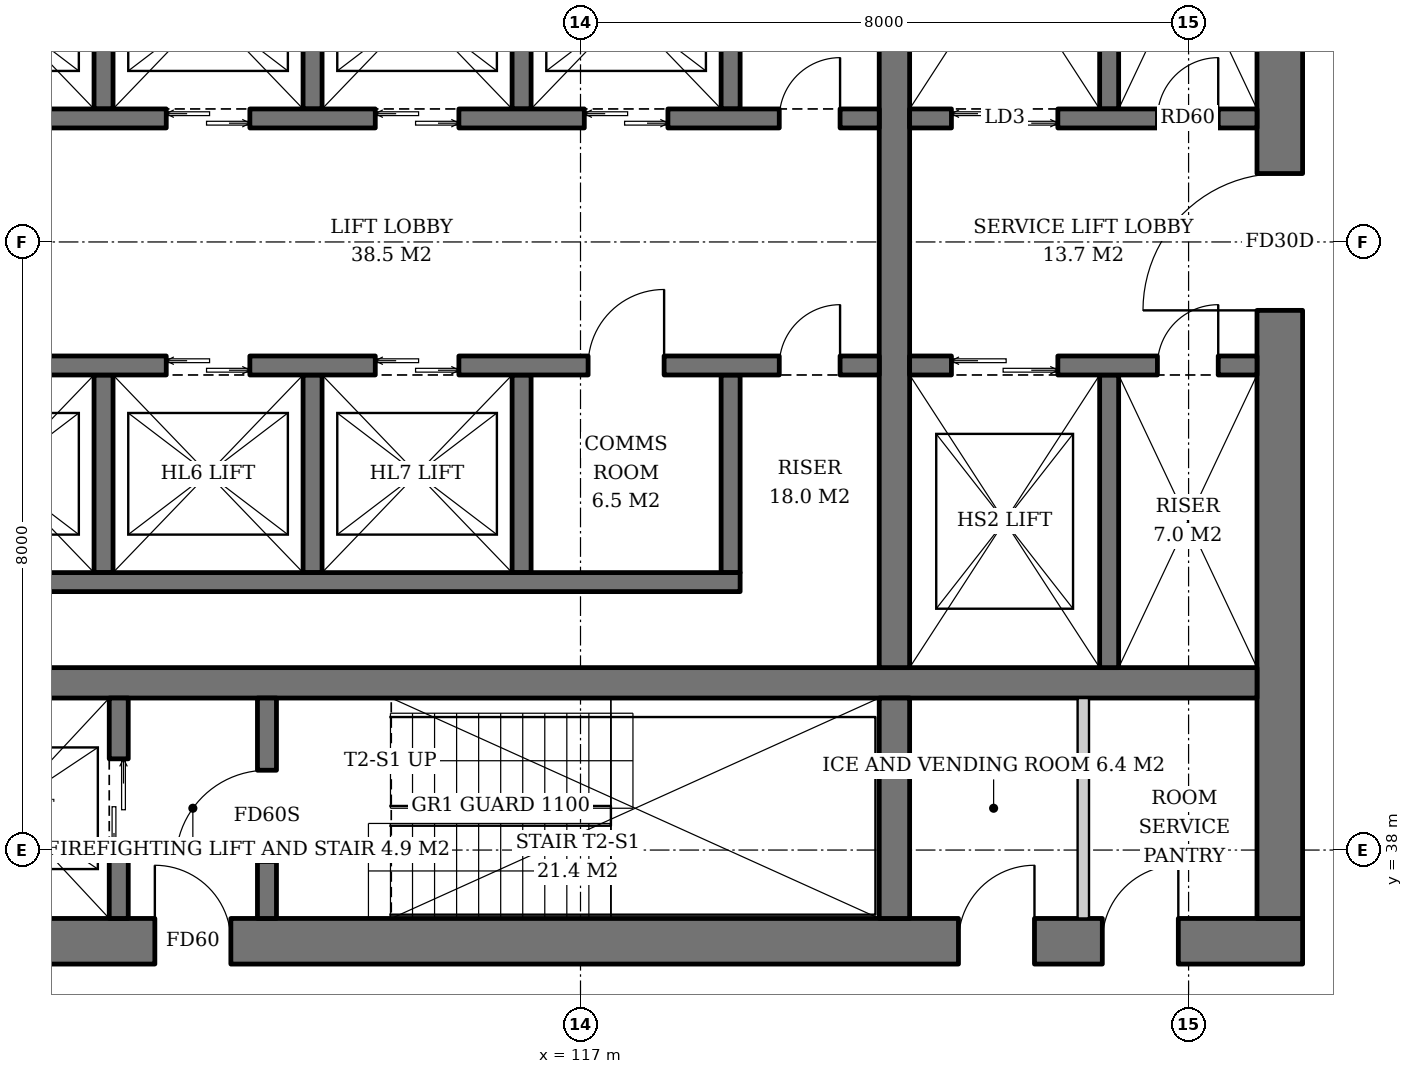
"""IFC4 building model, lengths in metres.
Left out: names, types, materials, properties, quantities, classifications, styles, units other than length and angle.
Written with IfcOpenShell. Run it as: python <this file> out.ifc"""

import sys

from ifc_helpers import new_model, si_unit, direction, frame, frame_2d, origin, place, context, subcontext, project, spatial, rectangle, extrude, element, fill, save


model = new_model("IFC4")
c1 = context("Model", 3, precision=1e-05, world=origin(), true_north=direction((0.0, 1.0)))
c2 = subcontext(c1, "Body", "Model", "MODEL_VIEW")
j1 = project(units=[si_unit("LENGTHUNIT", "METRE"), si_unit("PLANEANGLEUNIT", "RADIAN")], contexts=[c1])
p1 = place(None, origin())
s1 = spatial("IfcSite", under=j1, at=p1, CompositionType="ELEMENT")
p2 = place(p1, origin())
s2 = spatial("IfcBuilding", under=s1, at=p2, CompositionType="ELEMENT")
p3 = place(p2, frame((0.0, 0.0, 66.6)))
s3 = spatial("IfcBuildingStorey", under=s2, at=p3, CompositionType="ELEMENT", Elevation=66.6)
p4 = place(p3, frame((107.5, 36.8, 0.0), z_axis=(0.0, 0.0, 1.0), x_axis=(1.0, 0.0, 0.0)))
e1 = element("IfcWall", 1, at=p4, inside=s3, PredefinedType="SHEAR", context=c2, shape_type="SweptSolid", body=[
    extrude(rectangle(XDim=19.0, YDim=0.6, at=frame_2d((9.5, 0.0))), origin(), (0.0, 0.0, 1.0), 3.8),
])
p5 = place(p4, frame((3.9, 0.0, 0.0)))
e2 = element("IfcOpeningElement", 2, at=p5, cuts=e1, PredefinedType="OPENING", context=c2, shape_type="SweptSolid", body=[
    extrude(rectangle(XDim=1.0, YDim=2.1, at=frame_2d((0.5, 1.05))), frame((0.0, 0.31, 0.0), z_axis=(0.0, -1.0, 0.0), x_axis=(1.0, 0.0, 0.0)), (0.0, 0.0, 1.0), 0.62),
])
p6 = place(p4, frame((14.472, 0.0, 0.0)))
e3 = element("IfcOpeningElement", 3, at=p6, cuts=e1, PredefinedType="OPENING", context=c2, shape_type="SweptSolid", body=[
    extrude(rectangle(XDim=1.0, YDim=2.1, at=frame_2d((0.5, 1.05))), frame((0.0, 0.31, 0.0), z_axis=(0.0, -1.0, 0.0), x_axis=(1.0, 0.0, 0.0)), (0.0, 0.0, 1.0), 0.62),
])
p7 = place(p4, frame((16.365, 0.0, 0.0)))
e4 = element("IfcOpeningElement", 4, at=p7, cuts=e1, PredefinedType="OPENING", context=c2, shape_type="SweptSolid", body=[
    extrude(rectangle(XDim=1.0, YDim=2.1, at=frame_2d((0.5, 1.05))), frame((0.0, 0.31, 0.0), z_axis=(0.0, -1.0, 0.0), x_axis=(1.0, 0.0, 0.0)), (0.0, 0.0, 1.0), 0.62),
])
p8 = place(p3, frame((126.2, 37.1, 0.0), z_axis=(0.0, 0.0, 1.0), x_axis=(0.0, 1.0, 0.0)))
e5 = element("IfcWall", 5, at=p8, inside=s3, PredefinedType="SHEAR", context=c2, shape_type="SweptSolid", body=[
    extrude(rectangle(XDim=17.8, YDim=0.6, at=frame_2d((8.9, 0.0))), origin(), (0.0, 0.0, 1.0), 3.8),
])
p9 = place(p8, frame((8.0, 0.0, 0.0)))
e6 = element("IfcOpeningElement", 6, at=p9, cuts=e5, PredefinedType="OPENING", context=c2, shape_type="SweptSolid", body=[
    extrude(rectangle(XDim=1.8, YDim=2.4, at=frame_2d((0.9, 1.2))), frame((0.0, 0.31, 0.0), z_axis=(0.0, -1.0, 0.0), x_axis=(1.0, 0.0, 0.0)), (0.0, 0.0, 1.0), 0.62),
])
p10 = place(p3, frame((108.1, 40.2, 0.0), z_axis=(0.0, 0.0, 1.0), x_axis=(1.0, 0.0, 0.0)))
e7 = element("IfcWall", 7, at=p10, inside=s3, PredefinedType="SHEAR", context=c2, shape_type="SweptSolid", body=[
    extrude(rectangle(XDim=17.8, YDim=0.4, at=frame_2d((8.9, 0.0))), origin(), (0.0, 0.0, 1.0), 3.8),
])
p11 = place(p3, frame((121.13, 37.1, 0.0), z_axis=(0.0, 0.0, 1.0), x_axis=(0.0, 1.0, 0.0)))
e8 = element("IfcWall", 8, at=p11, inside=s3, PredefinedType="SHEAR", context=c2, shape_type="SweptSolid", body=[
    extrude(rectangle(XDim=2.9, YDim=0.4, at=frame_2d((1.45, 0.0))), origin(), (0.0, 0.0, 1.0), 3.8),
])
p12 = place(p3, frame((121.13, 40.4, 0.0), z_axis=(0.0, 0.0, 1.0), x_axis=(0.0, 1.0, 0.0)))
e9 = element("IfcWall", 9, at=p12, inside=s3, PredefinedType="SHEAR", context=c2, shape_type="SweptSolid", body=[
    extrude(rectangle(XDim=11.2, YDim=0.4, at=frame_2d((5.6, 0.0))), origin(), (0.0, 0.0, 1.0), 3.8),
])
p13 = place(p3, frame((110.925, 37.1, 0.0), z_axis=(0.0, 0.0, 1.0), x_axis=(0.0, 1.0, 0.0)))
e10 = element("IfcWall", 10, at=p13, inside=s3, PredefinedType="SHEAR", context=c2, shape_type="SweptSolid", body=[
    extrude(rectangle(XDim=2.9, YDim=0.25, at=frame_2d((1.45, 0.0))), origin(), (0.0, 0.0, 1.0), 3.8),
])
p14 = place(p13, frame((0.8, 0.0, 0.0)))
e11 = element("IfcOpeningElement", 11, at=p14, cuts=e10, PredefinedType="OPENING", context=c2, shape_type="SweptSolid", body=[
    extrude(rectangle(XDim=1.3, YDim=2.2, at=frame_2d((0.65, 1.1))), frame((0.0, 0.135, 0.0), z_axis=(0.0, -1.0, 0.0), x_axis=(1.0, 0.0, 0.0)), (0.0, 0.0, 1.0), 0.27),
])
p15 = place(p3, frame((112.875, 37.1, 0.0), z_axis=(0.0, 0.0, 1.0), x_axis=(0.0, 1.0, 0.0)))
e12 = element("IfcWall", 12, at=p15, inside=s3, PredefinedType="SHEAR", context=c2, shape_type="SweptSolid", body=[
    extrude(rectangle(XDim=2.9, YDim=0.25, at=frame_2d((1.45, 0.0))), origin(), (0.0, 0.0, 1.0), 3.8),
])
p16 = place(p15, frame((0.75, 0.0, 0.0)))
e13 = element("IfcOpeningElement", 13, at=p16, cuts=e12, PredefinedType="OPENING", context=c2, shape_type="SweptSolid", body=[
    extrude(rectangle(XDim=1.2, YDim=2.1, at=frame_2d((0.6, 1.05))), frame((0.0, 0.135, 0.0), z_axis=(0.0, -1.0, 0.0), x_axis=(1.0, 0.0, 0.0)), (0.0, 0.0, 1.0), 0.27),
])
for number, where, z_axis, x_axis in (
    (14, (110.725, 47.75, 0.0), (0.0, 0.0, 1.0), (0.0, 1.0, 0.0)),
    (15, (113.475, 47.75, 0.0), (0.0, 0.0, 1.0), (0.0, 1.0, 0.0)),
    (16, (116.225, 47.75, 0.0), (0.0, 0.0, 1.0), (0.0, 1.0, 0.0)),
    (17, (118.975, 47.75, 0.0), (0.0, 0.0, 1.0), (0.0, 1.0, 0.0)),
):
    element("IfcWall", number, at=place(p3, frame(where, z_axis=z_axis, x_axis=x_axis)), inside=s3, PredefinedType="SHEAR", context=c2, shape_type="SweptSolid", body=[
        extrude(rectangle(XDim=2.6, YDim=0.25, at=frame_2d((1.3, 0.0))), origin(), (0.0, 0.0, 1.0), 3.8),
    ])
p17 = place(p3, frame((108.1, 47.625, 0.0), z_axis=(0.0, 0.0, 1.0), x_axis=(1.0, 0.0, 0.0)))
e18 = element("IfcWall", 18, at=p17, inside=s3, PredefinedType="SHEAR", context=c2, shape_type="SweptSolid", body=[
    extrude(rectangle(XDim=12.83, YDim=0.25, at=frame_2d((6.415, 0.0))), origin(), (0.0, 0.0, 1.0), 3.8),
])
p18 = place(p17, frame((0.7, 0.0, 0.0)))
e19 = element("IfcOpeningElement", 19, at=p18, cuts=e18, PredefinedType="OPENING", context=c2, shape_type="SweptSolid", body=[
    extrude(rectangle(XDim=1.1, YDim=2.2, at=frame_2d((0.55, 1.1))), frame((0.0, 0.135, 0.0), z_axis=(0.0, -1.0, 0.0), x_axis=(1.0, 0.0, 0.0)), (0.0, 0.0, 1.0), 0.27),
])
p19 = place(p17, frame((3.45, 0.0, 0.0)))
e20 = element("IfcOpeningElement", 20, at=p19, cuts=e18, PredefinedType="OPENING", context=c2, shape_type="SweptSolid", body=[
    extrude(rectangle(XDim=1.1, YDim=2.2, at=frame_2d((0.55, 1.1))), frame((0.0, 0.135, 0.0), z_axis=(0.0, -1.0, 0.0), x_axis=(1.0, 0.0, 0.0)), (0.0, 0.0, 1.0), 0.27),
])
p20 = place(p17, frame((6.2, 0.0, 0.0)))
e21 = element("IfcOpeningElement", 21, at=p20, cuts=e18, PredefinedType="OPENING", context=c2, shape_type="SweptSolid", body=[
    extrude(rectangle(XDim=1.1, YDim=2.2, at=frame_2d((0.55, 1.1))), frame((0.0, 0.135, 0.0), z_axis=(0.0, -1.0, 0.0), x_axis=(1.0, 0.0, 0.0)), (0.0, 0.0, 1.0), 0.27),
])
p21 = place(p17, frame((8.95, 0.0, 0.0)))
e22 = element("IfcOpeningElement", 22, at=p21, cuts=e18, PredefinedType="OPENING", context=c2, shape_type="SweptSolid", body=[
    extrude(rectangle(XDim=1.1, YDim=2.2, at=frame_2d((0.55, 1.1))), frame((0.0, 0.135, 0.0), z_axis=(0.0, -1.0, 0.0), x_axis=(1.0, 0.0, 0.0)), (0.0, 0.0, 1.0), 0.27),
])
p22 = place(p17, frame((11.515, 0.0, 0.0)))
e23 = element("IfcOpeningElement", 23, at=p22, cuts=e18, PredefinedType="OPENING", context=c2, shape_type="SweptSolid", body=[
    extrude(rectangle(XDim=0.8, YDim=2.0, at=frame_2d((0.4, 1.0))), frame((0.0, 0.135, 0.0), z_axis=(0.0, -1.0, 0.0), x_axis=(1.0, 0.0, 0.0)), (0.0, 0.0, 1.0), 0.27),
])
for number, where, z_axis, x_axis in (
    (24, (110.725, 44.25, 0.0), (0.0, 0.0, 1.0), (0.0, -1.0, 0.0)),
    (25, (113.475, 44.25, 0.0), (0.0, 0.0, 1.0), (0.0, -1.0, 0.0)),
    (26, (116.225, 44.25, 0.0), (0.0, 0.0, 1.0), (0.0, -1.0, 0.0)),
    (27, (118.975, 44.25, 0.0), (0.0, 0.0, 1.0), (0.0, -1.0, 0.0)),
):
    element("IfcWall", number, at=place(p3, frame(where, z_axis=z_axis, x_axis=x_axis)), inside=s3, PredefinedType="SHEAR", context=c2, shape_type="SweptSolid", body=[
        extrude(rectangle(XDim=2.6, YDim=0.25, at=frame_2d((1.3, 0.0))), origin(), (0.0, 0.0, 1.0), 3.8),
    ])
p23 = place(p3, frame((108.1, 41.525, 0.0), z_axis=(0.0, 0.0, 1.0), x_axis=(1.0, 0.0, 0.0)))
e28 = element("IfcWall", 28, at=p23, inside=s3, PredefinedType="SHEAR", context=c2, shape_type="SweptSolid", body=[
    extrude(rectangle(XDim=11.0, YDim=0.25, at=frame_2d((5.5, 0.0))), origin(), (0.0, 0.0, 1.0), 3.8),
])
p24 = place(p3, frame((108.1, 44.375, 0.0), z_axis=(0.0, 0.0, 1.0), x_axis=(1.0, 0.0, 0.0)))
e29 = element("IfcWall", 29, at=p24, inside=s3, PredefinedType="SHEAR", context=c2, shape_type="SweptSolid", body=[
    extrude(rectangle(XDim=12.83, YDim=0.25, at=frame_2d((6.415, 0.0))), origin(), (0.0, 0.0, 1.0), 3.8),
])
p25 = place(p24, frame((0.7, 0.0, 0.0)))
e30 = element("IfcOpeningElement", 30, at=p25, cuts=e29, PredefinedType="OPENING", context=c2, shape_type="SweptSolid", body=[
    extrude(rectangle(XDim=1.1, YDim=2.2, at=frame_2d((0.55, 1.1))), frame((0.0, 0.135, 0.0), z_axis=(0.0, -1.0, 0.0), x_axis=(1.0, 0.0, 0.0)), (0.0, 0.0, 1.0), 0.27),
])
p26 = place(p24, frame((3.45, 0.0, 0.0)))
e31 = element("IfcOpeningElement", 31, at=p26, cuts=e29, PredefinedType="OPENING", context=c2, shape_type="SweptSolid", body=[
    extrude(rectangle(XDim=1.1, YDim=2.2, at=frame_2d((0.55, 1.1))), frame((0.0, 0.135, 0.0), z_axis=(0.0, -1.0, 0.0), x_axis=(1.0, 0.0, 0.0)), (0.0, 0.0, 1.0), 0.27),
])
p27 = place(p24, frame((6.2, 0.0, 0.0)))
e32 = element("IfcOpeningElement", 32, at=p27, cuts=e29, PredefinedType="OPENING", context=c2, shape_type="SweptSolid", body=[
    extrude(rectangle(XDim=1.1, YDim=2.2, at=frame_2d((0.55, 1.1))), frame((0.0, 0.135, 0.0), z_axis=(0.0, -1.0, 0.0), x_axis=(1.0, 0.0, 0.0)), (0.0, 0.0, 1.0), 0.27),
])
p28 = place(p24, frame((9.0, 0.0, 0.0)))
e33 = element("IfcOpeningElement", 33, at=p28, cuts=e29, PredefinedType="OPENING", context=c2, shape_type="SweptSolid", body=[
    extrude(rectangle(XDim=1.0, YDim=2.1, at=frame_2d((0.5, 1.05))), frame((0.0, 0.135, 0.0), z_axis=(0.0, -1.0, 0.0), x_axis=(1.0, 0.0, 0.0)), (0.0, 0.0, 1.0), 0.27),
])
p29 = place(p24, frame((11.515, 0.0, 0.0)))
e34 = element("IfcOpeningElement", 34, at=p29, cuts=e29, PredefinedType="OPENING", context=c2, shape_type="SweptSolid", body=[
    extrude(rectangle(XDim=0.8, YDim=2.0, at=frame_2d((0.4, 1.0))), frame((0.0, 0.135, 0.0), z_axis=(0.0, -1.0, 0.0), x_axis=(1.0, 0.0, 0.0)), (0.0, 0.0, 1.0), 0.27),
])
p30 = place(p3, frame((123.955, 47.75, 0.0), z_axis=(0.0, 0.0, 1.0), x_axis=(0.0, 1.0, 0.0)))
e35 = element("IfcWall", 35, at=p30, inside=s3, PredefinedType="SHEAR", context=c2, shape_type="SweptSolid", body=[
    extrude(rectangle(XDim=3.85, YDim=0.25, at=frame_2d((1.925, 0.0))), origin(), (0.0, 0.0, 1.0), 3.8),
])
p31 = place(p3, frame((121.33, 47.625, 0.0), z_axis=(0.0, 0.0, 1.0), x_axis=(1.0, 0.0, 0.0)))
e36 = element("IfcWall", 36, at=p31, inside=s3, PredefinedType="SHEAR", context=c2, shape_type="SweptSolid", body=[
    extrude(rectangle(XDim=4.57, YDim=0.25, at=frame_2d((2.285, 0.0))), origin(), (0.0, 0.0, 1.0), 3.8),
])
p32 = place(p31, frame((0.55, 0.0, 0.0)))
e37 = element("IfcOpeningElement", 37, at=p32, cuts=e36, PredefinedType="OPENING", context=c2, shape_type="SweptSolid", body=[
    extrude(rectangle(XDim=1.4, YDim=2.4, at=frame_2d((0.7, 1.2))), frame((0.0, 0.135, 0.0), z_axis=(0.0, -1.0, 0.0), x_axis=(1.0, 0.0, 0.0)), (0.0, 0.0, 1.0), 0.27),
])
p33 = place(p31, frame((3.26, 0.0, 0.0)))
e38 = element("IfcOpeningElement", 38, at=p33, cuts=e36, PredefinedType="OPENING", context=c2, shape_type="SweptSolid", body=[
    extrude(rectangle(XDim=0.8, YDim=2.0, at=frame_2d((0.4, 1.0))), frame((0.0, 0.135, 0.0), z_axis=(0.0, -1.0, 0.0), x_axis=(1.0, 0.0, 0.0)), (0.0, 0.0, 1.0), 0.27),
])
p34 = place(p3, frame((123.955, 44.25, 0.0), z_axis=(0.0, 0.0, 1.0), x_axis=(0.0, -1.0, 0.0)))
e39 = element("IfcWall", 39, at=p34, inside=s3, PredefinedType="SHEAR", context=c2, shape_type="SweptSolid", body=[
    extrude(rectangle(XDim=3.85, YDim=0.25, at=frame_2d((1.925, 0.0))), origin(), (0.0, 0.0, 1.0), 3.8),
])
p35 = place(p3, frame((121.33, 44.375, 0.0), z_axis=(0.0, 0.0, 1.0), x_axis=(1.0, 0.0, 0.0)))
e40 = element("IfcWall", 40, at=p35, inside=s3, PredefinedType="SHEAR", context=c2, shape_type="SweptSolid", body=[
    extrude(rectangle(XDim=4.57, YDim=0.25, at=frame_2d((2.285, 0.0))), origin(), (0.0, 0.0, 1.0), 3.8),
])
p36 = place(p35, frame((0.55, 0.0, 0.0)))
e41 = element("IfcOpeningElement", 41, at=p36, cuts=e40, PredefinedType="OPENING", context=c2, shape_type="SweptSolid", body=[
    extrude(rectangle(XDim=1.4, YDim=2.4, at=frame_2d((0.7, 1.2))), frame((0.0, 0.135, 0.0), z_axis=(0.0, -1.0, 0.0), x_axis=(1.0, 0.0, 0.0)), (0.0, 0.0, 1.0), 0.27),
])
p37 = place(p35, frame((3.26, 0.0, 0.0)))
e42 = element("IfcOpeningElement", 42, at=p37, cuts=e40, PredefinedType="OPENING", context=c2, shape_type="SweptSolid", body=[
    extrude(rectangle(XDim=0.8, YDim=2.0, at=frame_2d((0.4, 1.0))), frame((0.0, 0.135, 0.0), z_axis=(0.0, -1.0, 0.0), x_axis=(1.0, 0.0, 0.0)), (0.0, 0.0, 1.0), 0.27),
])
p38 = place(p3, frame((123.615, 37.1, 0.0), z_axis=(0.0, 0.0, 1.0), x_axis=(0.0, 1.0, 0.0)))
e43 = element("IfcWall", 43, at=p38, inside=s3, PredefinedType="SOLIDWALL", context=c2, shape_type="SweptSolid", body=[
    extrude(rectangle(XDim=2.9, YDim=0.15, at=frame_2d((1.45, 0.0))), origin(), (0.0, 0.0, 1.0), 3.6),
])
p39 = place(p14, origin())
e44 = element("IfcDoor", 44, at=p39, inside=s3, OperationType="DOUBLE_DOOR_SLIDING", PredefinedType="DOOR", context=c2, shape_type="SweptSolid", body=[
    extrude(rectangle(XDim=1.3, YDim=2.2, at=frame_2d((0.65, 1.1))), frame((0.0, 0.025, 0.0), z_axis=(0.0, -1.0, 0.0), x_axis=(1.0, 0.0, 0.0)), (0.0, 0.0, 1.0), 0.05),
])
fill(e11, e44)
p40 = place(p16, origin())
e45 = element("IfcDoor", 45, at=p40, inside=s3, OperationType="SINGLE_SWING_LEFT", PredefinedType="DOOR", context=c2, shape_type="SweptSolid", body=[
    extrude(rectangle(XDim=1.2, YDim=2.1, at=frame_2d((0.6, 1.05))), frame((0.0, 0.025, 0.0), z_axis=(0.0, -1.0, 0.0), x_axis=(1.0, 0.0, 0.0)), (0.0, 0.0, 1.0), 0.05),
])
fill(e13, e45)
p41 = place(p19, origin())
e46 = element("IfcDoor", 46, at=p41, inside=s3, OperationType="DOUBLE_DOOR_SLIDING", PredefinedType="DOOR", context=c2, shape_type="SweptSolid", body=[
    extrude(rectangle(XDim=1.1, YDim=2.2, at=frame_2d((0.55, 1.1))), frame((0.0, 0.025, 0.0), z_axis=(0.0, -1.0, 0.0), x_axis=(1.0, 0.0, 0.0)), (0.0, 0.0, 1.0), 0.05),
])
fill(e20, e46)
p42 = place(p20, origin())
e47 = element("IfcDoor", 47, at=p42, inside=s3, OperationType="DOUBLE_DOOR_SLIDING", PredefinedType="DOOR", context=c2, shape_type="SweptSolid", body=[
    extrude(rectangle(XDim=1.1, YDim=2.2, at=frame_2d((0.55, 1.1))), frame((0.0, 0.025, 0.0), z_axis=(0.0, -1.0, 0.0), x_axis=(1.0, 0.0, 0.0)), (0.0, 0.0, 1.0), 0.05),
])
fill(e21, e47)
p43 = place(p21, origin())
e48 = element("IfcDoor", 48, at=p43, inside=s3, OperationType="DOUBLE_DOOR_SLIDING", PredefinedType="DOOR", context=c2, shape_type="SweptSolid", body=[
    extrude(rectangle(XDim=1.1, YDim=2.2, at=frame_2d((0.55, 1.1))), frame((0.0, 0.025, 0.0), z_axis=(0.0, -1.0, 0.0), x_axis=(1.0, 0.0, 0.0)), (0.0, 0.0, 1.0), 0.05),
])
fill(e22, e48)
p44 = place(p22, origin())
e49 = element("IfcDoor", 49, at=p44, inside=s3, OperationType="SINGLE_SWING_RIGHT", PredefinedType="DOOR", context=c2, shape_type="SweptSolid", body=[
    extrude(rectangle(XDim=0.8, YDim=2.0, at=frame_2d((0.4, 1.0))), frame((0.0, 0.025, 0.0), z_axis=(0.0, -1.0, 0.0), x_axis=(1.0, 0.0, 0.0)), (0.0, 0.0, 1.0), 0.05),
])
fill(e23, e49)
p45 = place(p26, origin())
e50 = element("IfcDoor", 50, at=p45, inside=s3, OperationType="DOUBLE_DOOR_SLIDING", PredefinedType="DOOR", context=c2, shape_type="SweptSolid", body=[
    extrude(rectangle(XDim=1.1, YDim=2.2, at=frame_2d((0.55, 1.1))), frame((0.0, 0.025, 0.0), z_axis=(0.0, -1.0, 0.0), x_axis=(1.0, 0.0, 0.0)), (0.0, 0.0, 1.0), 0.05),
])
fill(e31, e50)
p46 = place(p27, origin())
e51 = element("IfcDoor", 51, at=p46, inside=s3, OperationType="DOUBLE_DOOR_SLIDING", PredefinedType="DOOR", context=c2, shape_type="SweptSolid", body=[
    extrude(rectangle(XDim=1.1, YDim=2.2, at=frame_2d((0.55, 1.1))), frame((0.0, 0.025, 0.0), z_axis=(0.0, -1.0, 0.0), x_axis=(1.0, 0.0, 0.0)), (0.0, 0.0, 1.0), 0.05),
])
fill(e32, e51)
p47 = place(p28, origin())
e52 = element("IfcDoor", 52, at=p47, inside=s3, OperationType="SINGLE_SWING_RIGHT", PredefinedType="DOOR", context=c2, shape_type="SweptSolid", body=[
    extrude(rectangle(XDim=1.0, YDim=2.1, at=frame_2d((0.5, 1.05))), frame((0.0, 0.025, 0.0), z_axis=(0.0, -1.0, 0.0), x_axis=(1.0, 0.0, 0.0)), (0.0, 0.0, 1.0), 0.05),
])
fill(e33, e52)
p48 = place(p29, origin())
e53 = element("IfcDoor", 53, at=p48, inside=s3, OperationType="SINGLE_SWING_RIGHT", PredefinedType="DOOR", context=c2, shape_type="SweptSolid", body=[
    extrude(rectangle(XDim=0.8, YDim=2.0, at=frame_2d((0.4, 1.0))), frame((0.0, 0.025, 0.0), z_axis=(0.0, -1.0, 0.0), x_axis=(1.0, 0.0, 0.0)), (0.0, 0.0, 1.0), 0.05),
])
fill(e34, e53)
p49 = place(p32, origin())
e54 = element("IfcDoor", 54, at=p49, inside=s3, OperationType="DOUBLE_DOOR_SLIDING", PredefinedType="DOOR", context=c2, shape_type="SweptSolid", body=[
    extrude(rectangle(XDim=1.4, YDim=2.4, at=frame_2d((0.7, 1.2))), frame((0.0, 0.025, 0.0), z_axis=(0.0, -1.0, 0.0), x_axis=(1.0, 0.0, 0.0)), (0.0, 0.0, 1.0), 0.05),
])
fill(e37, e54)
p50 = place(p33, origin())
e55 = element("IfcDoor", 55, at=p50, inside=s3, OperationType="SINGLE_SWING_RIGHT", PredefinedType="DOOR", context=c2, shape_type="SweptSolid", body=[
    extrude(rectangle(XDim=0.8, YDim=2.0, at=frame_2d((0.4, 1.0))), frame((0.0, 0.025, 0.0), z_axis=(0.0, -1.0, 0.0), x_axis=(1.0, 0.0, 0.0)), (0.0, 0.0, 1.0), 0.05),
])
fill(e38, e55)
p51 = place(p36, origin())
e56 = element("IfcDoor", 56, at=p51, inside=s3, OperationType="DOUBLE_DOOR_SLIDING", PredefinedType="DOOR", context=c2, shape_type="SweptSolid", body=[
    extrude(rectangle(XDim=1.4, YDim=2.4, at=frame_2d((0.7, 1.2))), frame((0.0, 0.025, 0.0), z_axis=(0.0, -1.0, 0.0), x_axis=(1.0, 0.0, 0.0)), (0.0, 0.0, 1.0), 0.05),
])
fill(e41, e56)
p52 = place(p37, origin())
e57 = element("IfcDoor", 57, at=p52, inside=s3, OperationType="SINGLE_SWING_RIGHT", PredefinedType="DOOR", context=c2, shape_type="SweptSolid", body=[
    extrude(rectangle(XDim=0.8, YDim=2.0, at=frame_2d((0.4, 1.0))), frame((0.0, 0.025, 0.0), z_axis=(0.0, -1.0, 0.0), x_axis=(1.0, 0.0, 0.0)), (0.0, 0.0, 1.0), 0.05),
])
fill(e42, e57)
p53 = place(p5, origin())
e58 = element("IfcDoor", 58, at=p53, inside=s3, OperationType="SINGLE_SWING_LEFT", PredefinedType="DOOR", context=c2, shape_type="SweptSolid", body=[
    extrude(rectangle(XDim=1.0, YDim=2.1, at=frame_2d((0.5, 1.05))), frame((0.0, 0.025, 0.0), z_axis=(0.0, -1.0, 0.0), x_axis=(1.0, 0.0, 0.0)), (0.0, 0.0, 1.0), 0.05),
])
fill(e2, e58)
p54 = place(p9, origin())
e59 = element("IfcDoor", 59, at=p54, inside=s3, OperationType="DOUBLE_DOOR_SINGLE_SWING", PredefinedType="DOOR", context=c2, shape_type="SweptSolid", body=[
    extrude(rectangle(XDim=1.8, YDim=2.4, at=frame_2d((0.9, 1.2))), frame((0.0, 0.025, 0.0), z_axis=(0.0, -1.0, 0.0), x_axis=(1.0, 0.0, 0.0)), (0.0, 0.0, 1.0), 0.05),
])
fill(e6, e59)
p55 = place(p6, origin())
e60 = element("IfcDoor", 60, at=p55, inside=s3, OperationType="SINGLE_SWING_RIGHT", PredefinedType="DOOR", context=c2, shape_type="SweptSolid", body=[
    extrude(rectangle(XDim=1.0, YDim=2.1, at=frame_2d((0.5, 1.05))), frame((0.0, 0.29, 0.0), z_axis=(0.0, -1.0, 0.0), x_axis=(1.0, 0.0, 0.0)), (0.0, 0.0, 1.0), 0.05),
])
fill(e3, e60)
p56 = place(p7, origin())
e61 = element("IfcDoor", 61, at=p56, inside=s3, OperationType="SINGLE_SWING_RIGHT", PredefinedType="DOOR", context=c2, shape_type="SweptSolid", body=[
    extrude(rectangle(XDim=1.0, YDim=2.1, at=frame_2d((0.5, 1.05))), frame((0.0, 0.29, 0.0), z_axis=(0.0, -1.0, 0.0), x_axis=(1.0, 0.0, 0.0)), (0.0, 0.0, 1.0), 0.05),
])
fill(e4, e61)
save(model, sys.argv[1])
